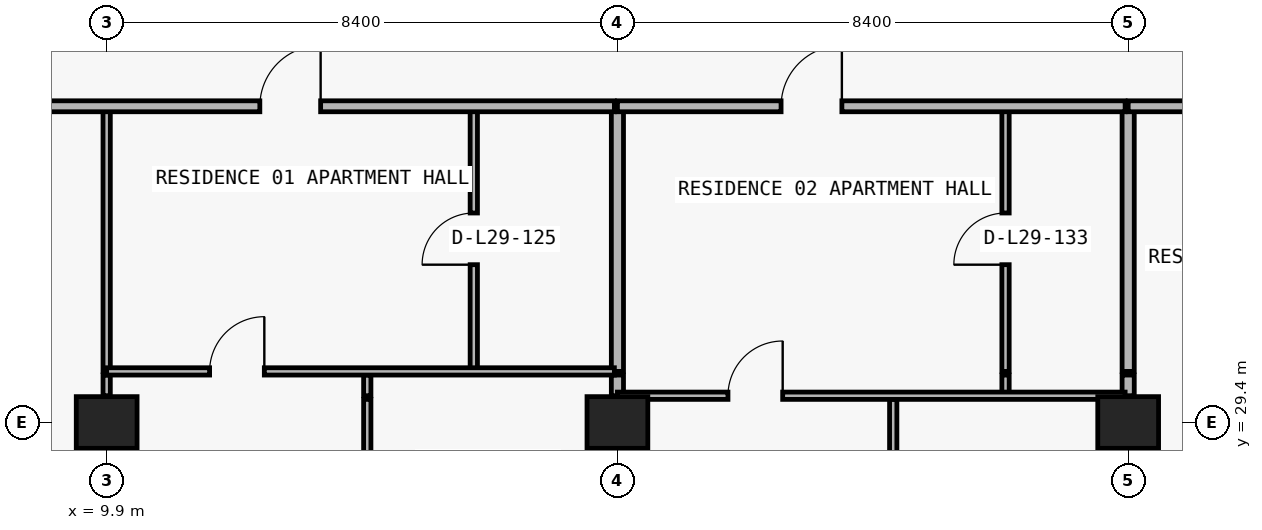
"""IFC4 building model, lengths in metres.
Left out: names, types, materials, properties, quantities, classifications, styles, units other than length and angle.
Written with IfcOpenShell. Run it as: python <this file> out.ifc"""

import sys

from ifc_helpers import new_model, si_unit, direction, frame, frame_2d, origin, origin_2d, place, context, subcontext, project, spatial, rectangle, extrude, element, fill, save


model = new_model("IFC4")
c1 = context("Model", 3, precision=1e-05, world=origin(), true_north=direction((0.0, 1.0)))
c2 = subcontext(c1, "Body", "Model", "MODEL_VIEW")
j1 = project(units=[si_unit("LENGTHUNIT", "METRE"), si_unit("PLANEANGLEUNIT", "RADIAN")], contexts=[c1])
p1 = place(None, origin())
s1 = spatial("IfcSite", under=j1, at=p1, CompositionType="ELEMENT")
p2 = place(p1, origin())
s2 = spatial("IfcBuilding", under=s1, at=p2, CompositionType="ELEMENT")
p3 = place(p2, frame((0.0, 0.0, 109.2)))
s3 = spatial("IfcBuildingStorey", under=s2, at=p3, CompositionType="ELEMENT", Elevation=109.2)
for number, where, z_axis, x_axis in (
    (1, (9.9, 29.4, 0.0), (0.0, 0.0, 1.0), (1.0, 0.0, 0.0)),
    (2, (18.3, 29.4, 0.0), (0.0, 0.0, 1.0), (1.0, 0.0, 0.0)),
    (3, (26.7, 29.4, 0.0), (0.0, 0.0, 1.0), (1.0, 0.0, 0.0)),
):
    element("IfcColumn", number, at=place(p3, frame(where, z_axis=z_axis, x_axis=x_axis)), inside=s3, PredefinedType="COLUMN", context=c2, shape_type="SweptSolid", body=[
        extrude(rectangle(XDim=1.0, YDim=0.85, at=origin_2d()), origin(), (0.0, 0.0, 1.0), 3.05),
    ])
p4 = place(p3, frame((26.7, 20.8, 0.0), z_axis=(0.0, 0.0, 1.0), x_axis=(0.0, 1.0, 0.0)))
e4 = element("IfcWall", 4, at=p4, inside=s3, PredefinedType="SHEAR", context=c2, shape_type="SweptSolid", body=[
    extrude(rectangle(XDim=8.6, YDim=0.45, at=frame_2d((4.3, 0.0))), origin(), (0.0, 0.0, 1.0), 3.05),
])
p5 = place(p3, frame((9.9, 25.09, 0.0), z_axis=(0.0, 0.0, 1.0), x_axis=(0.0, 1.0, 0.0)))
e5 = element("IfcWall", 5, at=p5, inside=s3, PredefinedType="PARTITIONING", context=c2, shape_type="SweptSolid", body=[
    extrude(rectangle(XDim=4.69, YDim=0.12, at=frame_2d((2.345, 0.0))), origin(), (0.0, 0.0, 1.0), 2.174),
])
p6 = place(p5, frame((1.895, 0.0, 0.0)))
e6 = element("IfcOpeningElement", 6, at=p6, cuts=e5, PredefinedType="OPENING", context=c2, shape_type="SweptSolid", body=[
    extrude(rectangle(XDim=0.9, YDim=2.124, at=frame_2d((0.45, 1.062))), frame((0.0, 0.07, 0.0), z_axis=(0.0, -1.0, 0.0), x_axis=(1.0, 0.0, 0.0)), (0.0, 0.0, 1.0), 0.14),
])
p7 = place(p3, frame((9.9, 29.84, 0.0), z_axis=(0.0, 0.0, 1.0), x_axis=(0.0, 1.0, 0.0)))
e7 = element("IfcWall", 7, at=p7, inside=s3, PredefinedType="PARTITIONING", context=c2, shape_type="SweptSolid", body=[
    extrude(rectangle(XDim=0.34, YDim=0.12, at=frame_2d((0.17, 0.0))), origin(), (0.0, 0.0, 1.0), 2.174),
])
p8 = place(p3, frame((9.9, 30.24, 0.0), z_axis=(0.0, 0.0, 1.0), x_axis=(0.0, 1.0, 0.0)))
e8 = element("IfcWall", 8, at=p8, inside=s3, PredefinedType="PARTITIONING", context=c2, shape_type="SweptSolid", body=[
    extrude(rectangle(XDim=4.36, YDim=0.12, at=frame_2d((2.18, 0.0))), origin(), (0.0, 0.0, 1.0), 2.174),
])
p9 = place(p3, frame((14.186, 25.09, 0.0), z_axis=(0.0, 0.0, 1.0), x_axis=(0.0, 1.0, 0.0)))
e9 = element("IfcWall", 9, at=p9, inside=s3, PredefinedType="PARTITIONING", context=c2, shape_type="SweptSolid", body=[
    extrude(rectangle(XDim=4.69, YDim=0.12, at=frame_2d((2.345, 0.0))), origin(), (0.0, 0.0, 1.0), 2.486),
])
p10 = place(p9, frame((1.895, 0.0, 0.0)))
e10 = element("IfcOpeningElement", 10, at=p10, cuts=e9, PredefinedType="OPENING", context=c2, shape_type="SweptSolid", body=[
    extrude(rectangle(XDim=0.9, YDim=2.15, at=frame_2d((0.45, 1.075))), frame((0.0, 0.07, 0.0), z_axis=(0.0, -1.0, 0.0), x_axis=(1.0, 0.0, 0.0)), (0.0, 0.0, 1.0), 0.14),
])
p11 = place(p3, frame((14.186, 29.84, 0.0), z_axis=(0.0, 0.0, 1.0), x_axis=(0.0, 1.0, 0.0)))
e11 = element("IfcWall", 11, at=p11, inside=s3, PredefinedType="PARTITIONING", context=c2, shape_type="SweptSolid", body=[
    extrude(rectangle(XDim=0.34, YDim=0.12, at=frame_2d((0.17, 0.0))), origin(), (0.0, 0.0, 1.0), 2.486),
])
p12 = place(p3, frame((15.938, 30.24, 0.0), z_axis=(0.0, 0.0, 1.0), x_axis=(0.0, 1.0, 0.0)))
e12 = element("IfcWall", 12, at=p12, inside=s3, PredefinedType="PARTITIONING", context=c2, shape_type="SweptSolid", body=[
    extrude(rectangle(XDim=4.36, YDim=0.12, at=frame_2d((2.18, 0.0))), origin(), (0.0, 0.0, 1.0), 3.05),
])
p13 = place(p12, frame((1.755, 0.0, 0.0)))
e13 = element("IfcOpeningElement", 13, at=p13, cuts=e12, PredefinedType="OPENING", context=c2, shape_type="SweptSolid", body=[
    extrude(rectangle(XDim=0.85, YDim=2.1, at=frame_2d((0.425, 1.05))), frame((0.0, 0.07, 0.0), z_axis=(0.0, -1.0, 0.0), x_axis=(1.0, 0.0, 0.0)), (0.0, 0.0, 1.0), 0.14),
])
p14 = place(p3, frame((18.3, 25.09, 0.0), z_axis=(0.0, 0.0, 1.0), x_axis=(0.0, 1.0, 0.0)))
e14 = element("IfcWall", 14, at=p14, inside=s3, PredefinedType="PARTITIONING", context=c2, shape_type="SweptSolid", body=[
    extrude(rectangle(XDim=4.69, YDim=0.2, at=frame_2d((2.345, 0.0))), origin(), (0.0, 0.0, 1.0), 2.174),
])
p15 = place(p3, frame((18.3, 29.84, 0.0), z_axis=(0.0, 0.0, 1.0), x_axis=(0.0, 1.0, 0.0)))
e15 = element("IfcWall", 15, at=p15, inside=s3, PredefinedType="PARTITIONING", context=c2, shape_type="SweptSolid", body=[
    extrude(rectangle(XDim=0.34, YDim=0.2, at=frame_2d((0.17, 0.0))), origin(), (0.0, 0.0, 1.0), 2.174),
])
p16 = place(p3, frame((18.3, 30.24, 0.0), z_axis=(0.0, 0.0, 1.0), x_axis=(0.0, 1.0, 0.0)))
e16 = element("IfcWall", 16, at=p16, inside=s3, PredefinedType="PARTITIONING", context=c2, shape_type="SweptSolid", body=[
    extrude(rectangle(XDim=4.36, YDim=0.2, at=frame_2d((2.18, 0.0))), origin(), (0.0, 0.0, 1.0), 2.174),
])
p17 = place(p3, frame((22.836, 25.09, 0.0), z_axis=(0.0, 0.0, 1.0), x_axis=(0.0, 1.0, 0.0)))
e17 = element("IfcWall", 17, at=p17, inside=s3, PredefinedType="PARTITIONING", context=c2, shape_type="SweptSolid", body=[
    extrude(rectangle(XDim=4.69, YDim=0.12, at=frame_2d((2.345, 0.0))), origin(), (0.0, 0.0, 1.0), 3.05),
])
p18 = place(p17, frame((1.895, 0.0, 0.0)))
e18 = element("IfcOpeningElement", 18, at=p18, cuts=e17, PredefinedType="OPENING", context=c2, shape_type="SweptSolid", body=[
    extrude(rectangle(XDim=0.9, YDim=2.15, at=frame_2d((0.45, 1.075))), frame((0.0, 0.07, 0.0), z_axis=(0.0, -1.0, 0.0), x_axis=(1.0, 0.0, 0.0)), (0.0, 0.0, 1.0), 0.14),
])
p19 = place(p3, frame((24.683, 29.84, 0.0), z_axis=(0.0, 0.0, 1.0), x_axis=(0.0, 1.0, 0.0)))
e19 = element("IfcWall", 19, at=p19, inside=s3, PredefinedType="PARTITIONING", context=c2, shape_type="SweptSolid", body=[
    extrude(rectangle(XDim=0.34, YDim=0.12, at=frame_2d((0.17, 0.0))), origin(), (0.0, 0.0, 1.0), 3.05),
])
p20 = place(p3, frame((24.683, 30.24, 0.0), z_axis=(0.0, 0.0, 1.0), x_axis=(0.0, 1.0, 0.0)))
e20 = element("IfcWall", 20, at=p20, inside=s3, PredefinedType="PARTITIONING", context=c2, shape_type="SweptSolid", body=[
    extrude(rectangle(XDim=4.36, YDim=0.12, at=frame_2d((2.18, 0.0))), origin(), (0.0, 0.0, 1.0), 3.05),
])
p21 = place(p20, frame((1.755, 0.0, 0.0)))
e21 = element("IfcOpeningElement", 21, at=p21, cuts=e20, PredefinedType="OPENING", context=c2, shape_type="SweptSolid", body=[
    extrude(rectangle(XDim=0.85, YDim=2.1, at=frame_2d((0.425, 1.05))), frame((0.0, 0.07, 0.0), z_axis=(0.0, -1.0, 0.0), x_axis=(1.0, 0.0, 0.0)), (0.0, 0.0, 1.0), 0.14),
])
p22 = place(p3, frame((26.7, 29.405, 0.0), z_axis=(0.0, 0.0, 1.0), x_axis=(0.0, 1.0, 0.0)))
e22 = element("IfcWall", 22, at=p22, inside=s3, PredefinedType="PARTITIONING", context=c2, shape_type="SweptSolid", body=[
    extrude(rectangle(XDim=0.375, YDim=0.2, at=frame_2d((0.188, 0.0))), origin(), (0.0, 0.0, 1.0), 3.05),
])
p23 = place(p3, frame((26.7, 29.84, 0.0), z_axis=(0.0, 0.0, 1.0), x_axis=(0.0, 1.0, 0.0)))
e23 = element("IfcWall", 23, at=p23, inside=s3, PredefinedType="PARTITIONING", context=c2, shape_type="SweptSolid", body=[
    extrude(rectangle(XDim=0.34, YDim=0.2, at=frame_2d((0.17, 0.0))), origin(), (0.0, 0.0, 1.0), 2.335),
])
p24 = place(p3, frame((26.7, 30.24, 0.0), z_axis=(0.0, 0.0, 1.0), x_axis=(0.0, 1.0, 0.0)))
e24 = element("IfcWall", 24, at=p24, inside=s3, PredefinedType="PARTITIONING", context=c2, shape_type="SweptSolid", body=[
    extrude(rectangle(XDim=4.36, YDim=0.2, at=frame_2d((2.18, 0.0))), origin(), (0.0, 0.0, 1.0), 2.335),
])
p25 = place(p3, frame((18.3, 29.84, 0.0), z_axis=(0.0, 0.0, 1.0), x_axis=(1.0, 0.0, 0.0)))
e25 = element("IfcWall", 25, at=p25, inside=s3, PredefinedType="PARTITIONING", context=c2, shape_type="SweptSolid", body=[
    extrude(rectangle(XDim=8.35, YDim=0.12, at=frame_2d((4.175, 0.0))), origin(), (0.0, 0.0, 1.0), 3.05),
])
p26 = place(p25, frame((1.818, 0.0, 0.0)))
e26 = element("IfcOpeningElement", 26, at=p26, cuts=e25, PredefinedType="OPENING", context=c2, shape_type="SweptSolid", body=[
    extrude(rectangle(XDim=0.9, YDim=2.15, at=frame_2d((0.45, 1.075))), frame((0.0, 0.07, 0.0), z_axis=(0.0, -1.0, 0.0), x_axis=(1.0, 0.0, 0.0)), (0.0, 0.0, 1.0), 0.14),
])
p27 = place(p3, frame((9.9, 30.24, 0.0), z_axis=(0.0, 0.0, 1.0), x_axis=(1.0, 0.0, 0.0)))
e27 = element("IfcWall", 27, at=p27, inside=s3, PredefinedType="PARTITIONING", context=c2, shape_type="SweptSolid", body=[
    extrude(rectangle(XDim=8.35, YDim=0.12, at=frame_2d((4.175, 0.0))), origin(), (0.0, 0.0, 1.0), 3.05),
])
p28 = place(p27, frame((1.693, 0.0, 0.0)))
e28 = element("IfcOpeningElement", 28, at=p28, cuts=e27, PredefinedType="OPENING", context=c2, shape_type="SweptSolid", body=[
    extrude(rectangle(XDim=0.9, YDim=2.15, at=frame_2d((0.45, 1.075))), frame((0.0, 0.07, 0.0), z_axis=(0.0, -1.0, 0.0), x_axis=(1.0, 0.0, 0.0)), (0.0, 0.0, 1.0), 0.14),
])
p29 = place(p3, frame((7.705, 34.6, 0.0), z_axis=(0.0, 0.0, 1.0), x_axis=(1.0, 0.0, 0.0)))
e29 = element("IfcWall", 29, at=p29, inside=s3, PredefinedType="PARTITIONING", context=c2, shape_type="SweptSolid", body=[
    extrude(rectangle(XDim=10.545, YDim=0.18, at=frame_2d((5.272, 0.0))), origin(), (0.0, 0.0, 1.0), 3.05),
])
p30 = place(p29, frame((4.714, 0.0, 0.0)))
e30 = element("IfcOpeningElement", 30, at=p30, cuts=e29, PredefinedType="OPENING", context=c2, shape_type="SweptSolid", body=[
    extrude(rectangle(XDim=1.0, YDim=2.2, at=frame_2d((0.5, 1.1))), frame((0.0, 0.1, 0.0), z_axis=(0.0, -1.0, 0.0), x_axis=(1.0, 0.0, 0.0)), (0.0, 0.0, 1.0), 0.2),
])
p31 = place(p3, frame((18.3, 34.6, 0.0), z_axis=(0.0, 0.0, 1.0), x_axis=(1.0, 0.0, 0.0)))
e31 = element("IfcWall", 31, at=p31, inside=s3, PredefinedType="PARTITIONING", context=c2, shape_type="SweptSolid", body=[
    extrude(rectangle(XDim=8.35, YDim=0.18, at=frame_2d((4.175, 0.0))), origin(), (0.0, 0.0, 1.0), 3.05),
])
p32 = place(p31, frame((2.691, 0.0, 0.0)))
e32 = element("IfcOpeningElement", 32, at=p32, cuts=e31, PredefinedType="OPENING", context=c2, shape_type="SweptSolid", body=[
    extrude(rectangle(XDim=1.0, YDim=2.2, at=frame_2d((0.5, 1.1))), frame((0.0, 0.1, 0.0), z_axis=(0.0, -1.0, 0.0), x_axis=(1.0, 0.0, 0.0)), (0.0, 0.0, 1.0), 0.2),
])
p33 = place(p3, frame((26.7, 34.6, 0.0), z_axis=(0.0, 0.0, 1.0), x_axis=(1.0, 0.0, 0.0)))
e33 = element("IfcWall", 33, at=p33, inside=s3, PredefinedType="PARTITIONING", context=c2, shape_type="SweptSolid", body=[
    extrude(rectangle(XDim=32.8, YDim=0.18, at=frame_2d((16.4, 0.0))), origin(), (0.0, 0.0, 1.0), 3.05),
])
p34 = place(p33, frame((2.812, 0.0, 0.0)))
e34 = element("IfcOpeningElement", 34, at=p34, cuts=e33, PredefinedType="OPENING", context=c2, shape_type="SweptSolid", body=[
    extrude(rectangle(XDim=1.0, YDim=2.2, at=frame_2d((0.5, 1.1))), frame((0.0, 0.1, 0.0), z_axis=(0.0, -1.0, 0.0), x_axis=(1.0, 0.0, 0.0)), (0.0, 0.0, 1.0), 0.2),
])
p35 = place(p33, frame((27.104, 0.0, 0.0)))
e35 = element("IfcOpeningElement", 35, at=p35, cuts=e33, PredefinedType="OPENING", context=c2, shape_type="SweptSolid", body=[
    extrude(rectangle(XDim=1.0, YDim=2.2, at=frame_2d((0.5, 1.1))), frame((0.0, 0.1, 0.0), z_axis=(0.0, -1.0, 0.0), x_axis=(1.0, 0.0, 0.0)), (0.0, 0.0, 1.0), 0.2),
])
p36 = place(p30, origin())
e36 = element("IfcDoor", 36, at=p36, inside=s3, OperationType="SINGLE_SWING_RIGHT", PredefinedType="DOOR", context=c2, shape_type="SweptSolid", body=[
    extrude(rectangle(XDim=1.0, YDim=2.2, at=frame_2d((0.5, 1.1))), frame((0.0, 0.025, 0.0), z_axis=(0.0, -1.0, 0.0), x_axis=(1.0, 0.0, 0.0)), (0.0, 0.0, 1.0), 0.05),
])
fill(e30, e36)
p37 = place(p13, origin())
e37 = element("IfcDoor", 37, at=p37, inside=s3, OperationType="SINGLE_SWING_LEFT", PredefinedType="DOOR", context=c2, shape_type="SweptSolid", body=[
    extrude(rectangle(XDim=0.85, YDim=2.1, at=frame_2d((0.425, 1.05))), frame((0.0, 0.025, 0.0), z_axis=(0.0, -1.0, 0.0), x_axis=(1.0, 0.0, 0.0)), (0.0, 0.0, 1.0), 0.05),
])
fill(e13, e37)
p38 = place(p28, origin())
e38 = element("IfcDoor", 38, at=p38, inside=s3, OperationType="SINGLE_SWING_RIGHT", PredefinedType="DOOR", context=c2, shape_type="SweptSolid", body=[
    extrude(rectangle(XDim=0.9, YDim=2.15, at=frame_2d((0.45, 1.075))), frame((0.0, 0.025, 0.0), z_axis=(0.0, -1.0, 0.0), x_axis=(1.0, 0.0, 0.0)), (0.0, 0.0, 1.0), 0.05),
])
fill(e28, e38)
p39 = place(p32, origin())
e39 = element("IfcDoor", 39, at=p39, inside=s3, OperationType="SINGLE_SWING_RIGHT", PredefinedType="DOOR", context=c2, shape_type="SweptSolid", body=[
    extrude(rectangle(XDim=1.0, YDim=2.2, at=frame_2d((0.5, 1.1))), frame((0.0, 0.025, 0.0), z_axis=(0.0, -1.0, 0.0), x_axis=(1.0, 0.0, 0.0)), (0.0, 0.0, 1.0), 0.05),
])
fill(e32, e39)
p40 = place(p21, origin())
e40 = element("IfcDoor", 40, at=p40, inside=s3, OperationType="SINGLE_SWING_LEFT", PredefinedType="DOOR", context=c2, shape_type="SweptSolid", body=[
    extrude(rectangle(XDim=0.85, YDim=2.1, at=frame_2d((0.425, 1.05))), frame((0.0, 0.025, 0.0), z_axis=(0.0, -1.0, 0.0), x_axis=(1.0, 0.0, 0.0)), (0.0, 0.0, 1.0), 0.05),
])
fill(e21, e40)
p41 = place(p26, origin())
e41 = element("IfcDoor", 41, at=p41, inside=s3, OperationType="SINGLE_SWING_RIGHT", PredefinedType="DOOR", context=c2, shape_type="SweptSolid", body=[
    extrude(rectangle(XDim=0.9, YDim=2.15, at=frame_2d((0.45, 1.075))), frame((0.0, 0.025, 0.0), z_axis=(0.0, -1.0, 0.0), x_axis=(1.0, 0.0, 0.0)), (0.0, 0.0, 1.0), 0.05),
])
fill(e26, e41)
save(model, sys.argv[1])
